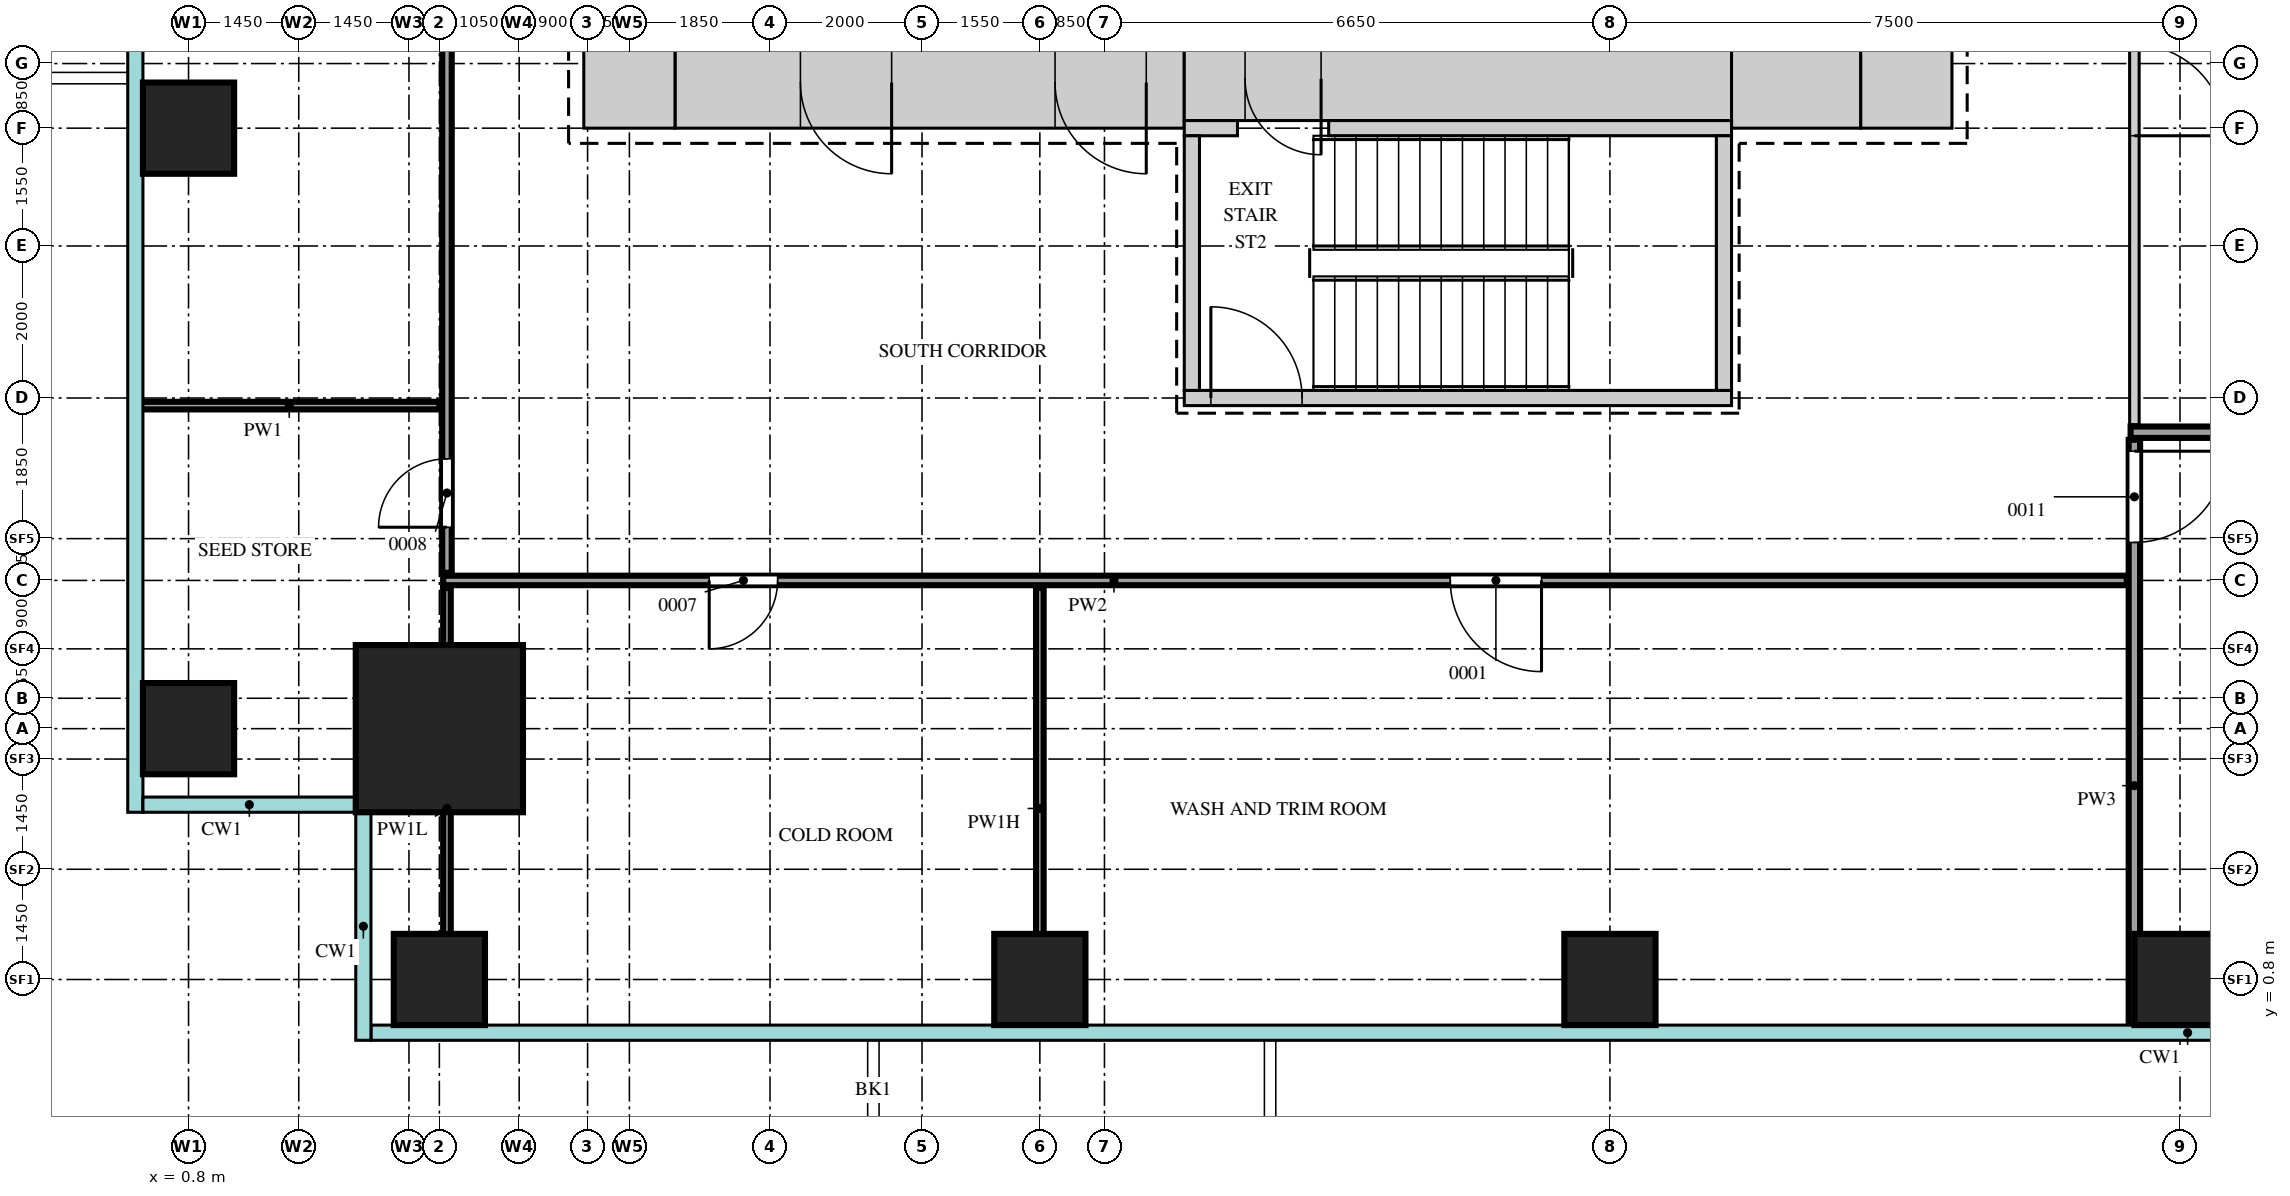
"""IFC4 building model, lengths in metres.
Left out: names, types, materials, properties, quantities, classifications, styles, units other than length and angle.
Written with IfcOpenShell. Run it as: python <this file> out.ifc"""

import sys

from ifc_helpers import new_model, si_unit, direction, frame, frame_2d, origin, origin_2d, place, context, subcontext, project, spatial, rectangle, extrude, source, transform, mapped, element, fill, save


model = new_model("IFC4")
c1 = context("Model", 3, precision=1e-05, world=origin(), true_north=direction((0.0, 1.0)))
c2 = subcontext(c1, "Body", "Model", "MODEL_VIEW")
j1 = project(units=[si_unit("LENGTHUNIT", "METRE"), si_unit("PLANEANGLEUNIT", "RADIAN")], contexts=[c1])
p1 = place(None, origin())
s1 = spatial("IfcSite", under=j1, at=p1, CompositionType="ELEMENT")
p2 = place(p1, origin())
s2 = spatial("IfcBuilding", under=s1, at=p2, CompositionType="ELEMENT")
p3 = place(p2, frame((0.0, 0.0, 42.0)))
s3 = spatial("IfcBuildingStorey", under=s2, at=p3, CompositionType="ELEMENT", Elevation=42.0)
m1 = source(origin(), c2, "Body", "SweptSolid", [
    extrude(rectangle(XDim=6.7, YDim=1.2, at=frame_2d((3.35, 0.0))), origin(), (0.0, 0.0, 1.0), 4.2),
])
p4 = place(p3, frame((7.2, 12.6, 0.0), z_axis=(0.0, 0.0, 1.0), x_axis=(1.0, 0.0, 0.0)))
e1 = element("IfcWall", 1, at=p4, inside=s3, PredefinedType="SHEAR", context=c2, shape_type="MappedRepresentation", body=[
    mapped(m1, transform((0.0, 0.0, 0.0))),
])
m2 = source(origin(), c2, "Body", "SweptSolid", [
    extrude(rectangle(XDim=1.2, YDim=2.1, at=frame_2d((0.6, 1.05))), frame((0.0, 0.61, 0.0), z_axis=(0.0, -1.0, 0.0), x_axis=(1.0, 0.0, 0.0)), (0.0, 0.0, 1.0), 1.22),
])
p5 = place(p4, frame((5.0, 0.0, 0.0)))
e2 = element("IfcOpeningElement", 2, at=p5, cuts=e1, PredefinedType="OPENING", context=c2, shape_type="MappedRepresentation", body=[
    mapped(m2, transform((0.0, 0.0, 0.0))),
])
p6 = place(p4, frame((1.65, 0.0, 0.0)))
e3 = element("IfcOpeningElement", 3, at=p6, cuts=e1, PredefinedType="OPENING", context=c2, shape_type="MappedRepresentation", body=[
    mapped(m2, transform((0.0, 0.0, 0.0))),
])
m3 = source(origin(), c2, "Body", "SweptSolid", [
    extrude(rectangle(XDim=7.2, YDim=1.1, at=frame_2d((3.6, 0.0))), origin(), (0.0, 0.0, 1.0), 4.2),
])
p7 = place(p3, frame((13.9, 12.65, 0.0), z_axis=(0.0, 0.0, 1.0), x_axis=(1.0, 0.0, 0.0)))
e4 = element("IfcWall", 4, at=p7, inside=s3, PredefinedType="SHEAR", context=c2, shape_type="MappedRepresentation", body=[
    mapped(m3, transform((0.0, 0.0, 0.0))),
])
m4 = source(origin(), c2, "Body", "SweptSolid", [
    extrude(rectangle(XDim=1.0, YDim=2.1, at=frame_2d((0.5, 1.05))), frame((0.0, 0.56, 0.0), z_axis=(0.0, -1.0, 0.0), x_axis=(1.0, 0.0, 0.0)), (0.0, 0.0, 1.0), 1.12),
])
p8 = place(p7, frame((0.8, 0.0, 0.0)))
e5 = element("IfcOpeningElement", 5, at=p8, cuts=e4, PredefinedType="OPENING", context=c2, shape_type="MappedRepresentation", body=[
    mapped(m4, transform((0.0, 0.0, 0.0))),
])
m5 = source(origin(), c2, "Body", "SweptSolid", [
    extrude(rectangle(XDim=1.7, YDim=1.2, at=frame_2d((0.85, 0.0))), origin(), (0.0, 0.0, 1.0), 4.2),
])
p9 = place(p3, frame((21.1, 12.6, 0.0), z_axis=(0.0, 0.0, 1.0), x_axis=(1.0, 0.0, 0.0)))
e6 = element("IfcWall", 6, at=p9, inside=s3, PredefinedType="SHEAR", context=c2, shape_type="MappedRepresentation", body=[
    mapped(m5, transform((0.0, 0.0, 0.0))),
])
m6 = source(origin(), c2, "Body", "SweptSolid", [
    extrude(rectangle(XDim=1.2, YDim=1.2, at=frame_2d((0.6, 0.0))), origin(), (0.0, 0.0, 1.0), 4.2),
])
for number, where, z_axis, x_axis in (
    (7, (22.8, 12.6, 0.0), (0.0, 0.0, 1.0), (1.0, 0.0, 0.0)),
    (8, (6.0, 12.6, 0.0), (0.0, 0.0, 1.0), (1.0, 0.0, 0.0)),
):
    element("IfcWall", number, at=place(p3, frame(where, z_axis=z_axis, x_axis=x_axis)), inside=s3, PredefinedType="SHEAR", context=c2, shape_type="MappedRepresentation", body=[
        mapped(m6, transform((0.0, 0.0, 0.0))),
    ])
m7 = source(origin(), c2, "Body", "SweptSolid", [
    extrude(rectangle(XDim=0.7, YDim=0.2, at=frame_2d((0.35, 0.0))), origin(), (0.0, 0.0, 1.0), 4.2),
])
p10 = place(p3, frame((13.9, 12.0, 0.0), z_axis=(0.0, 0.0, 1.0), x_axis=(1.0, 0.0, 0.0)))
e9 = element("IfcWall", 9, at=p10, inside=s3, PredefinedType="SHEAR", context=c2, shape_type="MappedRepresentation", body=[
    mapped(m7, transform((0.0, 0.0, 0.0))),
])
m8 = source(origin(), c2, "Body", "SweptSolid", [
    extrude(rectangle(XDim=5.3, YDim=0.2, at=frame_2d((2.65, 0.0))), origin(), (0.0, 0.0, 1.0), 4.2),
])
p11 = place(p3, frame((15.8, 12.0, 0.0), z_axis=(0.0, 0.0, 1.0), x_axis=(1.0, 0.0, 0.0)))
e10 = element("IfcWall", 10, at=p11, inside=s3, PredefinedType="SHEAR", context=c2, shape_type="MappedRepresentation", body=[
    mapped(m8, transform((0.0, 0.0, 0.0))),
])
m9 = source(origin(), c2, "Body", "SweptSolid", [
    extrude(rectangle(XDim=7.2, YDim=0.2, at=frame_2d((3.6, 0.0))), origin(), (0.0, 0.0, 1.0), 4.2),
])
p12 = place(p3, frame((13.9, 8.45, 0.0), z_axis=(0.0, 0.0, 1.0), x_axis=(1.0, 0.0, 0.0)))
e11 = element("IfcWall", 11, at=p12, inside=s3, PredefinedType="SHEAR", context=c2, shape_type="MappedRepresentation", body=[
    mapped(m9, transform((0.0, 0.0, 0.0))),
])
m10 = source(origin(), c2, "Body", "SweptSolid", [
    extrude(rectangle(XDim=1.2, YDim=2.1, at=frame_2d((0.6, 1.05))), frame((0.0, 0.11, 0.0), z_axis=(0.0, -1.0, 0.0), x_axis=(1.0, 0.0, 0.0)), (0.0, 0.0, 1.0), 0.22),
])
p13 = place(p12, frame((0.35, 0.0, 0.0)))
e12 = element("IfcOpeningElement", 12, at=p13, cuts=e11, PredefinedType="OPENING", context=c2, shape_type="MappedRepresentation", body=[
    mapped(m10, transform((0.0, 0.0, 0.0))),
])
m11 = source(origin(), c2, "Body", "SweptSolid", [
    extrude(rectangle(XDim=3.35, YDim=0.2, at=frame_2d((1.675, 0.0))), origin(), (0.0, 0.0, 1.0), 4.2),
])
for number, where, z_axis, x_axis in (
    (13, (21.0, 8.55, 0.0), (0.0, 0.0, 1.0), (0.0, 1.0, 0.0)),
    (14, (14.0, 8.55, 0.0), (0.0, 0.0, 1.0), (0.0, 1.0, 0.0)),
):
    element("IfcWall", number, at=place(p3, frame(where, z_axis=z_axis, x_axis=x_axis)), inside=s3, PredefinedType="SHEAR", context=c2, shape_type="MappedRepresentation", body=[
        mapped(m11, transform((0.0, 0.0, 0.0))),
    ])
m12 = source(origin(), c2, "Body", "SweptSolid", [
    extrude(rectangle(XDim=2.2, YDim=2.2, at=origin_2d()), origin(), (0.0, 0.0, 1.0), 4.5),
])
p14 = place(p3, frame((4.1, 4.1, 0.0), z_axis=(0.0, 0.0, 1.0), x_axis=(1.0, 0.0, 0.0)))
e15 = element("IfcColumn", 15, at=p14, inside=s3, PredefinedType="COLUMN", context=c2, shape_type="MappedRepresentation", body=[
    mapped(m12, transform((0.0, 0.0, 0.0))),
])
m13 = source(origin(), c2, "Body", "SweptSolid", [
    extrude(rectangle(XDim=1.2, YDim=1.2, at=origin_2d()), origin(), (0.0, 0.0, 1.0), 4.2),
])
for number, where, z_axis, x_axis in (
    (16, (4.1, 0.8, 0.0), (0.0, 0.0, 1.0), (1.0, 0.0, 0.0)),
    (17, (12.0, 0.8, 0.0), (0.0, 0.0, 1.0), (1.0, 0.0, 0.0)),
    (18, (19.5, 0.8, 0.0), (0.0, 0.0, 1.0), (1.0, 0.0, 0.0)),
    (19, (27.0, 0.8, 0.0), (0.0, 0.0, 1.0), (1.0, 0.0, 0.0)),
    (20, (0.8, 4.1, 0.0), (0.0, 0.0, 1.0), (1.0, 0.0, 0.0)),
    (21, (0.8, 12.0, 0.0), (0.0, 0.0, 1.0), (1.0, 0.0, 0.0)),
):
    element("IfcColumn", number, at=place(p3, frame(where, z_axis=z_axis, x_axis=x_axis)), inside=s3, PredefinedType="COLUMN", context=c2, shape_type="MappedRepresentation", body=[
        mapped(m13, transform((0.0, 0.0, 0.0))),
    ])
m14 = source(origin(), c2, "Body", "SweptSolid", [
    extrude(rectangle(XDim=5.8, YDim=0.1, at=frame_2d((2.9, 0.0))), origin(), (0.0, 0.0, 1.0), 3.6),
])
p15 = place(p3, frame((4.2, 0.15, 0.0), z_axis=(0.0, 0.0, 1.0), x_axis=(0.0, 1.0, 0.0)))
e22 = element("IfcWall", 22, at=p15, inside=s3, PredefinedType="PARTITIONING", context=c2, shape_type="MappedRepresentation", body=[
    mapped(m14, transform((0.0, 0.0, 0.0))),
])
m15 = source(origin(), c2, "Body", "SweptSolid", [
    extrude(rectangle(XDim=5.8, YDim=0.1, at=frame_2d((2.9, 0.0))), origin(), (0.0, 0.0, 1.0), 3.7),
])
p16 = place(p3, frame((12.0, 0.15, 0.0), z_axis=(0.0, 0.0, 1.0), x_axis=(0.0, 1.0, 0.0)))
e23 = element("IfcWall", 23, at=p16, inside=s3, PredefinedType="PARTITIONING", context=c2, shape_type="MappedRepresentation", body=[
    mapped(m15, transform((0.0, 0.0, 0.0))),
])
m16 = source(origin(), c2, "Body", "SweptSolid", [
    extrude(rectangle(XDim=7.75, YDim=0.15, at=frame_2d((3.875, 0.0))), origin(), (0.0, 0.0, 1.0), 4.3),
])
p17 = place(p3, frame((26.4, 0.15, 0.0), z_axis=(0.0, 0.0, 1.0), x_axis=(0.0, 1.0, 0.0)))
e24 = element("IfcWall", 24, at=p17, inside=s3, PredefinedType="PARTITIONING", context=c2, shape_type="MappedRepresentation", body=[
    mapped(m16, transform((0.0, 0.0, 0.0))),
])
m17 = source(origin(), c2, "Body", "SweptSolid", [
    extrude(rectangle(XDim=1.2, YDim=2.1, at=frame_2d((0.6, 1.05))), frame((0.0, 0.085, 0.0), z_axis=(0.0, -1.0, 0.0), x_axis=(1.0, 0.0, 0.0)), (0.0, 0.0, 1.0), 0.17),
])
p18 = place(p17, frame((6.4, 0.0, 0.0)))
e25 = element("IfcOpeningElement", 25, at=p18, cuts=e24, PredefinedType="OPENING", context=c2, shape_type="MappedRepresentation", body=[
    mapped(m17, transform((0.0, 0.0, 0.0))),
])
m18 = source(origin(), c2, "Body", "SweptSolid", [
    extrude(rectangle(XDim=22.15, YDim=0.125, at=frame_2d((11.075, 0.0))), origin(), (0.0, 0.0, 1.0), 4.3),
])
p19 = place(p3, frame((4.15, 6.05, 0.0), z_axis=(0.0, 0.0, 1.0), x_axis=(1.0, 0.0, 0.0)))
e26 = element("IfcWall", 26, at=p19, inside=s3, PredefinedType="PARTITIONING", context=c2, shape_type="MappedRepresentation", body=[
    mapped(m18, transform((0.0, 0.0, 0.0))),
])
m19 = source(origin(), c2, "Body", "SweptSolid", [
    extrude(rectangle(XDim=0.9, YDim=2.1, at=frame_2d((0.45, 1.05))), frame((0.0, 0.073, 0.0), z_axis=(0.0, -1.0, 0.0), x_axis=(1.0, 0.0, 0.0)), (0.0, 0.0, 1.0), 0.145),
])
p20 = place(p19, frame((3.5, 0.0, 0.0)))
e27 = element("IfcOpeningElement", 27, at=p20, cuts=e26, PredefinedType="OPENING", context=c2, shape_type="MappedRepresentation", body=[
    mapped(m19, transform((0.0, 0.0, 0.0))),
])
m20 = source(origin(), c2, "Body", "SweptSolid", [
    extrude(rectangle(XDim=1.2, YDim=2.1, at=frame_2d((0.6, 1.05))), frame((0.0, 0.073, 0.0), z_axis=(0.0, -1.0, 0.0), x_axis=(1.0, 0.0, 0.0)), (0.0, 0.0, 1.0), 0.145),
])
p21 = place(p19, frame((13.25, 0.0, 0.0)))
e28 = element("IfcOpeningElement", 28, at=p21, cuts=e26, PredefinedType="OPENING", context=c2, shape_type="MappedRepresentation", body=[
    mapped(m20, transform((0.0, 0.0, 0.0))),
])
m21 = source(origin(), c2, "Body", "SweptSolid", [
    extrude(rectangle(XDim=27.75, YDim=0.125, at=frame_2d((13.875, 0.0))), origin(), (0.0, 0.0, 1.0), 4.3),
])
p22 = place(p3, frame((4.2, 6.15, 0.0), z_axis=(0.0, 0.0, 1.0), x_axis=(0.0, 1.0, 0.0)))
e29 = element("IfcWall", 29, at=p22, inside=s3, PredefinedType="PARTITIONING", context=c2, shape_type="MappedRepresentation", body=[
    mapped(m21, transform((0.0, 0.0, 0.0))),
])
p23 = place(p22, frame((0.6, 0.0, 0.0)))
e30 = element("IfcOpeningElement", 30, at=p23, cuts=e29, PredefinedType="OPENING", context=c2, shape_type="MappedRepresentation", body=[
    mapped(m19, transform((0.0, 0.0, 0.0))),
])
p24 = place(p22, frame((7.45, 0.0, 0.0)))
e31 = element("IfcOpeningElement", 31, at=p24, cuts=e29, PredefinedType="OPENING", context=c2, shape_type="MappedRepresentation", body=[
    mapped(m19, transform((0.0, 0.0, 0.0))),
])
p25 = place(p22, frame((20.55, 0.0, 0.0)))
e32 = element("IfcOpeningElement", 32, at=p25, cuts=e29, PredefinedType="OPENING", context=c2, shape_type="MappedRepresentation", body=[
    mapped(m19, transform((0.0, 0.0, 0.0))),
])
m22 = source(origin(), c2, "Body", "SweptSolid", [
    extrude(rectangle(XDim=27.5, YDim=0.15, at=frame_2d((13.75, 0.0))), origin(), (0.0, 0.0, 1.0), 4.3),
])
p26 = place(p3, frame((26.35, 8.0, 0.0), z_axis=(0.0, 0.0, 1.0), x_axis=(1.0, 0.0, 0.0)))
e33 = element("IfcWall", 33, at=p26, inside=s3, PredefinedType="PARTITIONING", context=c2, shape_type="MappedRepresentation", body=[
    mapped(m22, transform((0.0, 0.0, 0.0))),
])
m23 = source(origin(), c2, "Body", "SweptSolid", [
    extrude(rectangle(XDim=27.1, YDim=0.125, at=frame_2d((13.55, 0.0))), origin(), (0.0, 0.0, 1.0), 4.3),
])
p27 = place(p3, frame((26.4, 8.1, 0.0), z_axis=(0.0, 0.0, 1.0), x_axis=(0.0, 1.0, 0.0)))
e34 = element("IfcWall", 34, at=p27, inside=s3, PredefinedType="PARTITIONING", context=c2, shape_type="MappedRepresentation", body=[
    mapped(m23, transform((0.0, 0.0, 0.0))),
])
p28 = place(p27, frame((3.8, 0.0, 0.0)))
e35 = element("IfcOpeningElement", 35, at=p28, cuts=e34, PredefinedType="OPENING", context=c2, shape_type="MappedRepresentation", body=[
    mapped(m20, transform((0.0, 0.0, 0.0))),
])
p29 = place(p27, frame((12.8, 0.0, 0.0)))
e36 = element("IfcOpeningElement", 36, at=p29, cuts=e34, PredefinedType="OPENING", context=c2, shape_type="MappedRepresentation", body=[
    mapped(m20, transform((0.0, 0.0, 0.0))),
])
m24 = source(origin(), c2, "Body", "SweptSolid", [
    extrude(rectangle(XDim=3.95, YDim=0.1, at=frame_2d((1.975, 0.0))), origin(), (0.0, 0.0, 1.0), 4.3),
])
p30 = place(p3, frame((0.15, 8.35, 0.0), z_axis=(0.0, 0.0, 1.0), x_axis=(1.0, 0.0, 0.0)))
e37 = element("IfcWall", 37, at=p30, inside=s3, PredefinedType="PARTITIONING", context=c2, shape_type="MappedRepresentation", body=[
    mapped(m24, transform((0.0, 0.0, 0.0))),
])
m25 = source(origin(), c2, "Body", "SweptSolid", [
    extrude(rectangle(XDim=1.2, YDim=2.1, at=frame_2d((0.6, 1.05))), frame((0.0, 0.55, 0.0), z_axis=(0.0, -1.0, 0.0), x_axis=(1.0, 0.0, 0.0)), (0.0, 0.0, 1.0), 1.1),
])
p31 = place(p5, origin())
e38 = element("IfcDoor", 38, at=p31, inside=s3, OperationType="SINGLE_SWING_RIGHT", PredefinedType="DOOR", context=c2, shape_type="MappedRepresentation", body=[
    mapped(m25, transform((0.0, 0.0, 0.0))),
])
fill(e2, e38)
p32 = place(p6, origin())
e39 = element("IfcDoor", 39, at=p32, inside=s3, OperationType="SINGLE_SWING_RIGHT", PredefinedType="DOOR", context=c2, shape_type="MappedRepresentation", body=[
    mapped(m25, transform((0.0, 0.0, 0.0))),
])
fill(e3, e39)
m26 = source(origin(), c2, "Body", "SweptSolid", [
    extrude(rectangle(XDim=1.0, YDim=2.1, at=frame_2d((0.5, 1.05))), frame((0.0, 0.5, 0.0), z_axis=(0.0, -1.0, 0.0), x_axis=(1.0, 0.0, 0.0)), (0.0, 0.0, 1.0), 1.0),
])
p33 = place(p8, origin())
e40 = element("IfcDoor", 40, at=p33, inside=s3, OperationType="SINGLE_SWING_RIGHT", PredefinedType="DOOR", context=c2, shape_type="MappedRepresentation", body=[
    mapped(m26, transform((0.0, 0.0, 0.0))),
])
fill(e5, e40)
m27 = source(origin(), c2, "Body", "SweptSolid", [
    extrude(rectangle(XDim=1.2, YDim=2.1, at=frame_2d((0.6, 1.05))), frame((0.0, 0.025, 0.0), z_axis=(0.0, -1.0, 0.0), x_axis=(1.0, 0.0, 0.0)), (0.0, 0.0, 1.0), 0.05),
])
p34 = place(p18, origin())
e41 = element("IfcDoor", 41, at=p34, inside=s3, OperationType="SINGLE_SWING_RIGHT", PredefinedType="DOOR", context=c2, shape_type="MappedRepresentation", body=[
    mapped(m27, transform((0.0, 0.0, 0.0))),
])
fill(e25, e41)
p35 = place(p28, origin())
e42 = element("IfcDoor", 42, at=p35, inside=s3, OperationType="SINGLE_SWING_LEFT", PredefinedType="DOOR", context=c2, shape_type="MappedRepresentation", body=[
    mapped(m27, transform((0.0, 0.0, 0.0))),
])
fill(e35, e42)
m28 = source(origin(), c2, "Body", "SweptSolid", [
    extrude(rectangle(XDim=0.9, YDim=2.1, at=frame_2d((0.45, 1.05))), frame((0.0, 0.025, 0.0), z_axis=(0.0, -1.0, 0.0), x_axis=(1.0, 0.0, 0.0)), (0.0, 0.0, 1.0), 0.05),
])
p36 = place(p23, origin())
e43 = element("IfcDoor", 43, at=p36, inside=s3, OperationType="SINGLE_SWING_RIGHT", PredefinedType="DOOR", context=c2, shape_type="MappedRepresentation", body=[
    mapped(m28, transform((0.0, 0.0, 0.0))),
])
fill(e30, e43)
p37 = place(p20, origin())
e44 = element("IfcDoor", 44, at=p37, inside=s3, OperationType="SINGLE_SWING_LEFT", PredefinedType="DOOR", context=c2, shape_type="MappedRepresentation", body=[
    mapped(m28, transform((0.0, 0.0, 0.0))),
])
fill(e27, e44)
p38 = place(p21, origin())
e45 = element("IfcDoor", 45, at=p38, inside=s3, OperationType="SINGLE_SWING_RIGHT", PredefinedType="DOOR", context=c2, shape_type="MappedRepresentation", body=[
    mapped(m27, transform((0.0, 0.0, 0.0))),
])
fill(e28, e45)
p39 = place(p13, origin())
e46 = element("IfcDoor", 46, at=p39, inside=s3, OperationType="SINGLE_SWING_RIGHT", PredefinedType="DOOR", context=c2, shape_type="MappedRepresentation", body=[
    mapped(m27, transform((0.0, 0.0, 0.0))),
])
fill(e12, e46)
save(model, sys.argv[1])
